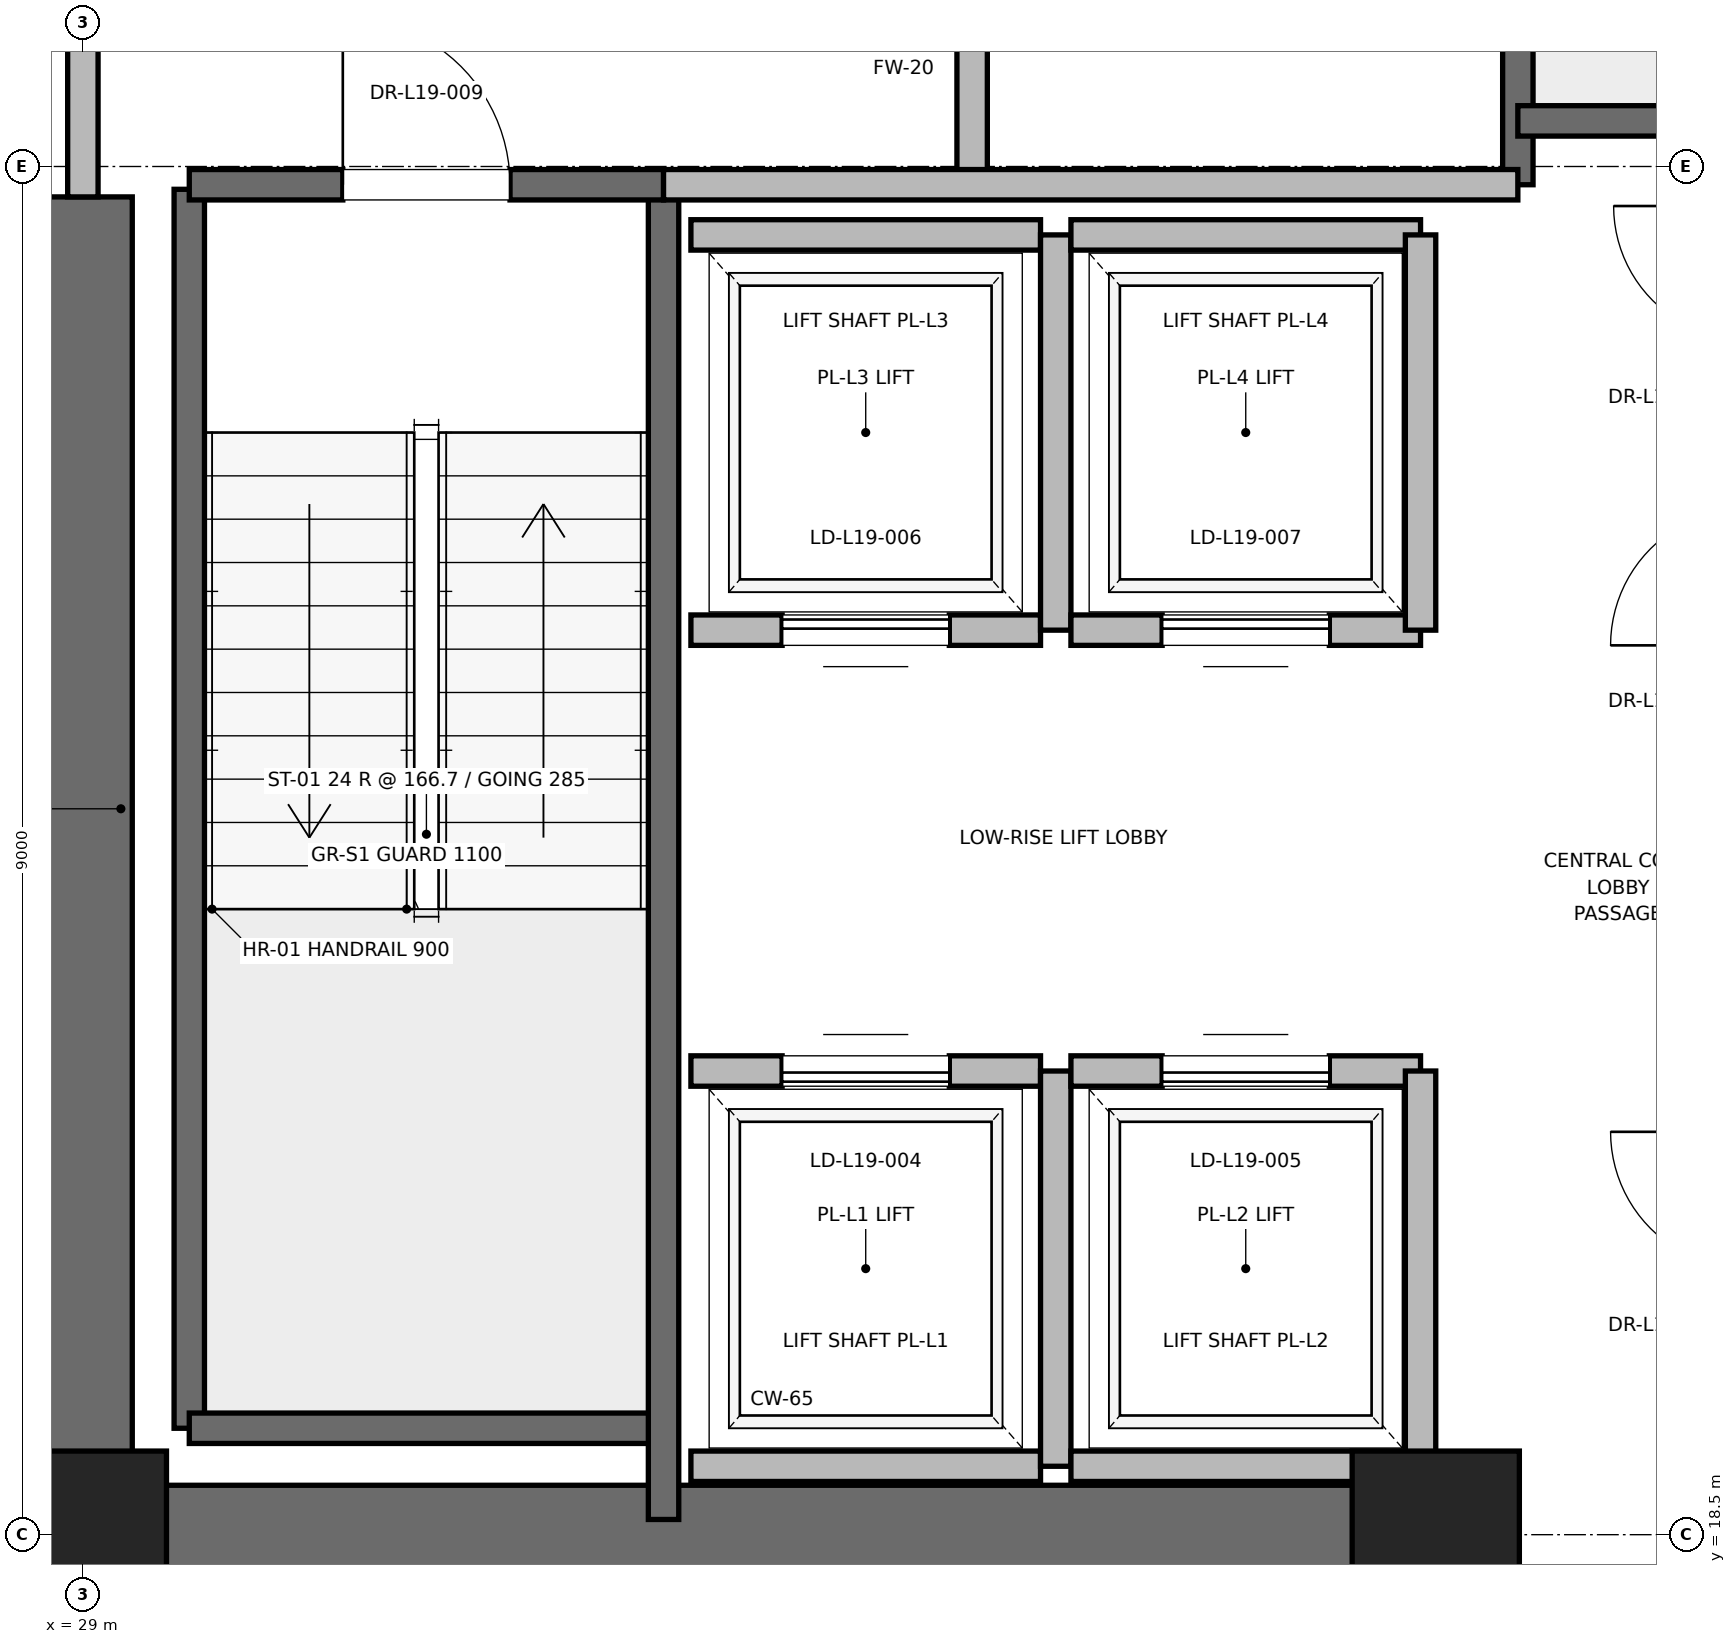
"""IFC4 building model, lengths in metres.
Left out: names, types, materials, properties, quantities, classifications, styles, units other than length and angle.
Written with IfcOpenShell. Run it as: python <this file> out.ifc"""

import sys

from ifc_helpers import new_model, si_unit, direction, frame, frame_2d, origin, origin_2d, place, context, subcontext, project, spatial, rectangle, extrude, element, fill, save


model = new_model("IFC4")
c1 = context("Model", 3, precision=1e-05, world=origin(), true_north=direction((0.0, 1.0)))
c2 = subcontext(c1, "Body", "Model", "MODEL_VIEW")
j1 = project(units=[si_unit("LENGTHUNIT", "METRE"), si_unit("PLANEANGLEUNIT", "RADIAN")], contexts=[c1])
p1 = place(None, origin())
s1 = spatial("IfcSite", under=j1, at=p1, CompositionType="ELEMENT")
p2 = place(p1, origin())
s2 = spatial("IfcBuilding", under=s1, at=p2, CompositionType="ELEMENT")
p3 = place(p2, frame((0.0, 0.0, 83.6)))
s3 = spatial("IfcBuildingStorey", under=s2, at=p3, CompositionType="ELEMENT", Elevation=83.6)
for number, where, z_axis, x_axis in (
    (1, (29.0, 18.5, 0.0), (0.0, 0.0, 1.0), (1.0, 0.0, 0.0)),
    (2, (37.9, 18.5, 0.0), (0.0, 0.0, 1.0), (1.0, 0.0, 0.0)),
):
    element("IfcColumn", number, at=place(p3, frame(where, z_axis=z_axis, x_axis=x_axis)), inside=s3, PredefinedType="PILASTER", context=c2, shape_type="SweptSolid", body=[
        extrude(rectangle(XDim=1.1, YDim=1.1, at=origin_2d()), origin(), (0.0, 0.0, 1.0), 4.0),
    ])
p4 = place(p3, frame((29.0, 18.5, 0.0), z_axis=(0.0, 0.0, 1.0), x_axis=(1.0, 0.0, 0.0)))
e3 = element("IfcWall", 3, at=p4, inside=s3, PredefinedType="SHEAR", context=c2, shape_type="SweptSolid", body=[
    extrude(rectangle(XDim=9.2, YDim=0.65, at=frame_2d((4.6, 0.0))), origin(), (0.0, 0.0, 1.0), 3.76),
])
p5 = place(p3, frame((29.0, 18.5, 0.0), z_axis=(0.0, 0.0, 1.0), x_axis=(0.0, 1.0, 0.0)))
e4 = element("IfcWall", 4, at=p5, inside=s3, PredefinedType="SHEAR", context=c2, shape_type="SweptSolid", body=[
    extrude(rectangle(XDim=8.8, YDim=0.65, at=frame_2d((4.4, 0.0))), origin(), (0.0, 0.0, 1.0), 3.76),
])
p6 = place(p3, frame((29.7, 19.2, 0.0), z_axis=(0.0, 0.0, 1.0), x_axis=(0.0, 1.0, 0.0)))
e5 = element("IfcWall", 5, at=p6, inside=s3, PredefinedType="SOLIDWALL", context=c2, shape_type="SweptSolid", body=[
    extrude(rectangle(XDim=8.15, YDim=0.2, at=frame_2d((4.075, 0.0))), origin(), (0.0, 0.0, 1.0), 3.76),
])
p7 = place(p3, frame((29.7, 19.2, 0.0), z_axis=(0.0, 0.0, 1.0), x_axis=(1.0, 0.0, 0.0)))
e6 = element("IfcWall", 6, at=p7, inside=s3, PredefinedType="SOLIDWALL", context=c2, shape_type="SweptSolid", body=[
    extrude(rectangle(XDim=3.12, YDim=0.2, at=frame_2d((1.56, 0.0))), origin(), (0.0, 0.0, 1.0), 3.76),
])
p8 = place(p3, frame((32.82, 18.6, 0.0), z_axis=(0.0, 0.0, 1.0), x_axis=(0.0, 1.0, 0.0)))
e7 = element("IfcWall", 7, at=p8, inside=s3, PredefinedType="SOLIDWALL", context=c2, shape_type="SweptSolid", body=[
    extrude(rectangle(XDim=8.78, YDim=0.2, at=frame_2d((4.39, 0.0))), origin(), (0.0, 0.0, 1.0), 3.76),
])
p9 = place(p3, frame((29.7, 27.38, 0.0), z_axis=(0.0, 0.0, 1.0), x_axis=(1.0, 0.0, 0.0)))
e8 = element("IfcWall", 8, at=p9, inside=s3, PredefinedType="SOLIDWALL", context=c2, shape_type="SweptSolid", body=[
    extrude(rectangle(XDim=3.12, YDim=0.2, at=frame_2d((1.56, 0.0))), origin(), (0.0, 0.0, 1.0), 3.76),
])
p10 = place(p9, frame((1.01, 0.0, 0.0)))
e9 = element("IfcOpeningElement", 9, at=p10, cuts=e8, PredefinedType="OPENING", context=c2, shape_type="SweptSolid", body=[
    extrude(rectangle(XDim=1.1, YDim=2.15, at=frame_2d((0.55, 1.075))), frame((0.0, 0.1, 0.0), z_axis=(0.0, -1.0, 0.0), x_axis=(1.0, 0.0, 0.0)), (0.0, 0.0, 1.0), 0.2),
])
p11 = place(p3, frame((38.44, 27.38, 0.0), z_axis=(0.0, 0.0, 1.0), x_axis=(0.0, 1.0, 0.0)))
e10 = element("IfcWall", 10, at=p11, inside=s3, PredefinedType="SOLIDWALL", context=c2, shape_type="SweptSolid", body=[
    extrude(rectangle(XDim=8.87, YDim=0.2, at=frame_2d((4.435, 0.0))), origin(), (0.0, 0.0, 1.0), 3.76),
])
p12 = place(p3, frame((38.44, 27.8, 0.0), z_axis=(0.0, 0.0, 1.0), x_axis=(1.0, 0.0, 0.0)))
e11 = element("IfcWall", 11, at=p12, inside=s3, PredefinedType="SOLIDWALL", context=c2, shape_type="SweptSolid", body=[
    extrude(rectangle(XDim=3.32, YDim=0.2, at=frame_2d((1.66, 0.0))), origin(), (0.0, 0.0, 1.0), 3.76),
])
p13 = place(p3, frame((34.85, 27.38, 0.0), z_axis=(0.0, 0.0, 1.0), x_axis=(0.0, 1.0, 0.0)))
e12 = element("IfcWall", 12, at=p13, inside=s3, PredefinedType="PARTITIONING", context=c2, shape_type="SweptSolid", body=[
    extrude(rectangle(XDim=3.37, YDim=0.2, at=frame_2d((1.685, 0.0))), origin(), (0.0, 0.0, 1.0), 3.76),
])
p14 = place(p13, frame((1.11, 0.0, 0.0)))
e13 = element("IfcOpeningElement", 13, at=p14, cuts=e12, PredefinedType="OPENING", context=c2, shape_type="SweptSolid", body=[
    extrude(rectangle(XDim=1.15, YDim=2.2, at=frame_2d((0.575, 1.1))), frame((0.0, 0.1, 0.0), z_axis=(0.0, -1.0, 0.0), x_axis=(1.0, 0.0, 0.0)), (0.0, 0.0, 1.0), 0.2),
])
p15 = place(p3, frame((29.0, 27.3, 0.0), z_axis=(0.0, 0.0, 1.0), x_axis=(0.0, 1.0, 0.0)))
e14 = element("IfcWall", 14, at=p15, inside=s3, PredefinedType="PARTITIONING", context=c2, shape_type="SweptSolid", body=[
    extrude(rectangle(XDim=3.4, YDim=0.2, at=frame_2d((1.7, 0.0))), origin(), (0.0, 0.0, 1.0), 2.54),
])
p16 = place(p15, frame((1.125, 0.0, 0.0)))
e15 = element("IfcOpeningElement", 15, at=p16, cuts=e14, PredefinedType="OPENING", context=c2, shape_type="SweptSolid", body=[
    extrude(rectangle(XDim=1.15, YDim=2.2, at=frame_2d((0.575, 1.1))), frame((0.0, 0.1, 0.0), z_axis=(0.0, -1.0, 0.0), x_axis=(1.0, 0.0, 0.0)), (0.0, 0.0, 1.0), 0.2),
])
p17 = place(p3, frame((32.82, 27.38, 0.0), z_axis=(0.0, 0.0, 1.0), x_axis=(1.0, 0.0, 0.0)))
e16 = element("IfcWall", 16, at=p17, inside=s3, PredefinedType="PARTITIONING", context=c2, shape_type="SweptSolid", body=[
    extrude(rectangle(XDim=5.62, YDim=0.2, at=frame_2d((2.81, 0.0))), origin(), (0.0, 0.0, 1.0), 3.76),
])
p18 = place(p3, frame((33.0, 18.95, 0.0), z_axis=(0.0, 0.0, 1.0), x_axis=(1.0, 0.0, 0.0)))
e17 = element("IfcWall", 17, at=p18, inside=s3, PredefinedType="SOLIDWALL", context=c2, shape_type="SweptSolid", body=[
    extrude(rectangle(XDim=2.3, YDim=0.2, at=frame_2d((1.15, 0.0))), origin(), (0.0, 0.0, 1.0), 3.76),
])
p19 = place(p3, frame((35.3, 21.55, 0.0), z_axis=(0.0, 0.0, 1.0), x_axis=(-1.0, 0.0, 0.0)))
e18 = element("IfcWall", 18, at=p19, inside=s3, PredefinedType="SOLIDWALL", context=c2, shape_type="SweptSolid", body=[
    extrude(rectangle(XDim=2.3, YDim=0.2, at=frame_2d((1.15, 0.0))), origin(), (0.0, 0.0, 1.0), 3.76),
])
p20 = place(p19, frame((0.6, 0.0, 0.0)))
e19 = element("IfcOpeningElement", 19, at=p20, cuts=e18, PredefinedType="OPENING", context=c2, shape_type="SweptSolid", body=[
    extrude(rectangle(XDim=1.1, YDim=2.2, at=frame_2d((0.55, 1.1))), frame((0.0, 0.1, 0.0), z_axis=(0.0, -1.0, 0.0), x_axis=(1.0, 0.0, 0.0)), (0.0, 0.0, 1.0), 0.2),
])
p21 = place(p3, frame((35.4, 18.95, 0.0), z_axis=(0.0, 0.0, 1.0), x_axis=(0.0, 1.0, 0.0)))
e20 = element("IfcWall", 20, at=p21, inside=s3, PredefinedType="SOLIDWALL", context=c2, shape_type="SweptSolid", body=[
    extrude(rectangle(XDim=2.6, YDim=0.2, at=frame_2d((1.3, 0.0))), origin(), (0.0, 0.0, 1.0), 3.76),
])
p22 = place(p3, frame((35.5, 18.95, 0.0), z_axis=(0.0, 0.0, 1.0), x_axis=(1.0, 0.0, 0.0)))
e21 = element("IfcWall", 21, at=p22, inside=s3, PredefinedType="SOLIDWALL", context=c2, shape_type="SweptSolid", body=[
    extrude(rectangle(XDim=2.3, YDim=0.2, at=frame_2d((1.15, 0.0))), origin(), (0.0, 0.0, 1.0), 2.54),
])
p23 = place(p3, frame((37.8, 21.55, 0.0), z_axis=(0.0, 0.0, 1.0), x_axis=(-1.0, 0.0, 0.0)))
e22 = element("IfcWall", 22, at=p23, inside=s3, PredefinedType="SOLIDWALL", context=c2, shape_type="SweptSolid", body=[
    extrude(rectangle(XDim=2.3, YDim=0.2, at=frame_2d((1.15, 0.0))), origin(), (0.0, 0.0, 1.0), 3.76),
])
p24 = place(p23, frame((0.6, 0.0, 0.0)))
e23 = element("IfcOpeningElement", 23, at=p24, cuts=e22, PredefinedType="OPENING", context=c2, shape_type="SweptSolid", body=[
    extrude(rectangle(XDim=1.1, YDim=2.2, at=frame_2d((0.55, 1.1))), frame((0.0, 0.1, 0.0), z_axis=(0.0, -1.0, 0.0), x_axis=(1.0, 0.0, 0.0)), (0.0, 0.0, 1.0), 0.2),
])
p25 = place(p3, frame((37.8, 18.95, 0.0), z_axis=(0.0, 0.0, 1.0), x_axis=(0.0, 1.0, 0.0)))
e24 = element("IfcWall", 24, at=p25, inside=s3, PredefinedType="SOLIDWALL", context=c2, shape_type="SweptSolid", body=[
    extrude(rectangle(XDim=2.6, YDim=0.2, at=frame_2d((1.3, 0.0))), origin(), (0.0, 0.0, 1.0), 2.54),
])
p26 = place(p3, frame((33.0, 24.45, 0.0), z_axis=(0.0, 0.0, 1.0), x_axis=(1.0, 0.0, 0.0)))
e25 = element("IfcWall", 25, at=p26, inside=s3, PredefinedType="SOLIDWALL", context=c2, shape_type="SweptSolid", body=[
    extrude(rectangle(XDim=2.3, YDim=0.2, at=frame_2d((1.15, 0.0))), origin(), (0.0, 0.0, 1.0), 3.76),
])
p27 = place(p26, frame((0.6, 0.0, 0.0)))
e26 = element("IfcOpeningElement", 26, at=p27, cuts=e25, PredefinedType="OPENING", context=c2, shape_type="SweptSolid", body=[
    extrude(rectangle(XDim=1.1, YDim=2.2, at=frame_2d((0.55, 1.1))), frame((0.0, 0.1, 0.0), z_axis=(0.0, -1.0, 0.0), x_axis=(1.0, 0.0, 0.0)), (0.0, 0.0, 1.0), 0.2),
])
p28 = place(p3, frame((35.3, 27.05, 0.0), z_axis=(0.0, 0.0, 1.0), x_axis=(-1.0, 0.0, 0.0)))
e27 = element("IfcWall", 27, at=p28, inside=s3, PredefinedType="SOLIDWALL", context=c2, shape_type="SweptSolid", body=[
    extrude(rectangle(XDim=2.3, YDim=0.2, at=frame_2d((1.15, 0.0))), origin(), (0.0, 0.0, 1.0), 3.76),
])
p29 = place(p3, frame((35.4, 24.45, 0.0), z_axis=(0.0, 0.0, 1.0), x_axis=(0.0, 1.0, 0.0)))
e28 = element("IfcWall", 28, at=p29, inside=s3, PredefinedType="SOLIDWALL", context=c2, shape_type="SweptSolid", body=[
    extrude(rectangle(XDim=2.6, YDim=0.2, at=frame_2d((1.3, 0.0))), origin(), (0.0, 0.0, 1.0), 3.76),
])
p30 = place(p3, frame((35.5, 24.45, 0.0), z_axis=(0.0, 0.0, 1.0), x_axis=(1.0, 0.0, 0.0)))
e29 = element("IfcWall", 29, at=p30, inside=s3, PredefinedType="SOLIDWALL", context=c2, shape_type="SweptSolid", body=[
    extrude(rectangle(XDim=2.3, YDim=0.2, at=frame_2d((1.15, 0.0))), origin(), (0.0, 0.0, 1.0), 3.76),
])
p31 = place(p30, frame((0.6, 0.0, 0.0)))
e30 = element("IfcOpeningElement", 30, at=p31, cuts=e29, PredefinedType="OPENING", context=c2, shape_type="SweptSolid", body=[
    extrude(rectangle(XDim=1.1, YDim=2.2, at=frame_2d((0.55, 1.1))), frame((0.0, 0.1, 0.0), z_axis=(0.0, -1.0, 0.0), x_axis=(1.0, 0.0, 0.0)), (0.0, 0.0, 1.0), 0.2),
])
p32 = place(p3, frame((37.8, 27.05, 0.0), z_axis=(0.0, 0.0, 1.0), x_axis=(-1.0, 0.0, 0.0)))
e31 = element("IfcWall", 31, at=p32, inside=s3, PredefinedType="SOLIDWALL", context=c2, shape_type="SweptSolid", body=[
    extrude(rectangle(XDim=2.3, YDim=0.2, at=frame_2d((1.15, 0.0))), origin(), (0.0, 0.0, 1.0), 3.76),
])
p33 = place(p3, frame((37.8, 24.45, 0.0), z_axis=(0.0, 0.0, 1.0), x_axis=(0.0, 1.0, 0.0)))
e32 = element("IfcWall", 32, at=p33, inside=s3, PredefinedType="SOLIDWALL", context=c2, shape_type="SweptSolid", body=[
    extrude(rectangle(XDim=2.6, YDim=0.2, at=frame_2d((1.3, 0.0))), origin(), (0.0, 0.0, 1.0), 3.76),
])
p34 = place(p10, origin())
e33 = element("IfcDoor", 33, at=p34, inside=s3, OperationType="SINGLE_SWING_LEFT", PredefinedType="DOOR", context=c2, shape_type="SweptSolid", body=[
    extrude(rectangle(XDim=1.1, YDim=2.15, at=frame_2d((0.55, 1.075))), frame((0.0, 0.025, 0.0), z_axis=(0.0, -1.0, 0.0), x_axis=(1.0, 0.0, 0.0)), (0.0, 0.0, 1.0), 0.05),
])
fill(e9, e33)
p35 = place(p20, origin())
e34 = element("IfcDoor", 34, at=p35, inside=s3, OperationType="SLIDING_TO_RIGHT", PredefinedType="DOOR", context=c2, shape_type="SweptSolid", body=[
    extrude(rectangle(XDim=1.1, YDim=2.2, at=frame_2d((0.55, 1.1))), frame((0.0, 0.025, 0.0), z_axis=(0.0, -1.0, 0.0), x_axis=(1.0, 0.0, 0.0)), (0.0, 0.0, 1.0), 0.05),
])
fill(e19, e34)
p36 = place(p24, origin())
e35 = element("IfcDoor", 35, at=p36, inside=s3, OperationType="SLIDING_TO_RIGHT", PredefinedType="DOOR", context=c2, shape_type="SweptSolid", body=[
    extrude(rectangle(XDim=1.1, YDim=2.2, at=frame_2d((0.55, 1.1))), frame((0.0, 0.025, 0.0), z_axis=(0.0, -1.0, 0.0), x_axis=(1.0, 0.0, 0.0)), (0.0, 0.0, 1.0), 0.05),
])
fill(e23, e35)
p37 = place(p27, origin())
e36 = element("IfcDoor", 36, at=p37, inside=s3, OperationType="SLIDING_TO_RIGHT", PredefinedType="DOOR", context=c2, shape_type="SweptSolid", body=[
    extrude(rectangle(XDim=1.1, YDim=2.2, at=frame_2d((0.55, 1.1))), frame((0.0, 0.025, 0.0), z_axis=(0.0, -1.0, 0.0), x_axis=(1.0, 0.0, 0.0)), (0.0, 0.0, 1.0), 0.05),
])
fill(e26, e36)
p38 = place(p31, origin())
e37 = element("IfcDoor", 37, at=p38, inside=s3, OperationType="SLIDING_TO_RIGHT", PredefinedType="DOOR", context=c2, shape_type="SweptSolid", body=[
    extrude(rectangle(XDim=1.1, YDim=2.2, at=frame_2d((0.55, 1.1))), frame((0.0, 0.025, 0.0), z_axis=(0.0, -1.0, 0.0), x_axis=(1.0, 0.0, 0.0)), (0.0, 0.0, 1.0), 0.05),
])
fill(e30, e37)
save(model, sys.argv[1])
